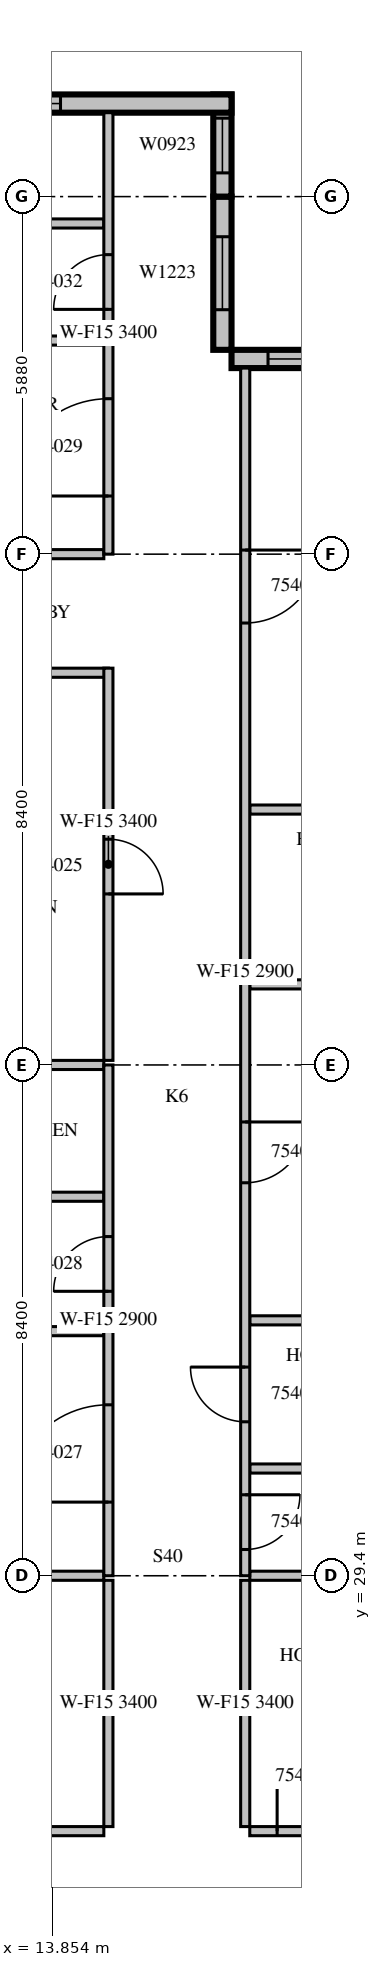
"""IFC4 building model, lengths in metres.
Left out: names, types, materials, properties, quantities, classifications, styles, units other than length and angle.
Written with IfcOpenShell. Run it as: python <this file> out.ifc"""

import sys

from ifc_helpers import new_model, si_unit, direction, frame, frame_2d, origin, place, context, subcontext, project, spatial, rectangle, extrude, source, transform, mapped, element, fill, save


model = new_model("IFC4")
c1 = context("Model", 3, precision=1e-05, world=origin(), true_north=direction((0.0, 1.0)))
c2 = subcontext(c1, "Body", "Model", "MODEL_VIEW")
j1 = project(units=[si_unit("LENGTHUNIT", "METRE"), si_unit("PLANEANGLEUNIT", "RADIAN")], contexts=[c1])
p1 = place(None, origin())
s1 = spatial("IfcSite", under=j1, at=p1, CompositionType="ELEMENT")
p2 = place(p1, origin())
s2 = spatial("IfcBuilding", under=s1, at=p2, CompositionType="ELEMENT")
p3 = place(p2, frame((0.0, 0.0, 238.6)))
s3 = spatial("IfcBuildingStorey", under=s2, at=p3, CompositionType="ELEMENT", Elevation=238.6)
m1 = source(origin(), c2, "Body", "SweptSolid", [
    extrude(rectangle(XDim=4.2, YDim=0.3, at=frame_2d((2.1, 0.0))), origin(), (0.0, 0.0, 1.0), 3.4),
])
p4 = place(p3, frame((21.0, 49.41, 0.0), z_axis=(0.0, 0.0, 1.0), x_axis=(-1.0, 0.0, 0.0)))
e1 = element("IfcWall", 1, at=p4, inside=s3, PredefinedType="STANDARD", context=c2, shape_type="MappedRepresentation", body=[
    mapped(m1, transform((0.0, 0.0, 0.0), scale=1.0)),
])
m2 = source(origin(), c2, "Body", "SweptSolid", [
    extrude(rectangle(XDim=3.0, YDim=2.3, at=frame_2d((1.5, 1.15))), frame((0.0, 0.16, 0.0), z_axis=(0.0, -1.0, 0.0), x_axis=(1.0, 0.0, 0.0)), (0.0, 0.0, 1.0), 0.32),
])
p5 = place(p4, frame((0.6, 0.0, 0.6)))
e2 = element("IfcOpeningElement", 2, at=p5, cuts=e1, PredefinedType="OPENING", context=c2, shape_type="MappedRepresentation", body=[
    mapped(m2, transform((0.0, 0.0, 0.0), scale=1.0)),
])
m3 = source(origin(), c2, "Body", "SweptSolid", [
    extrude(rectangle(XDim=2.52, YDim=0.3, at=frame_2d((1.26, 0.0))), origin(), (0.0, 0.0, 1.0), 3.4),
])
p6 = place(p3, frame((16.65, 49.56, 0.0), z_axis=(0.0, 0.0, 1.0), x_axis=(0.0, 1.0, 0.0)))
e3 = element("IfcWall", 3, at=p6, inside=s3, PredefinedType="STANDARD", context=c2, shape_type="MappedRepresentation", body=[
    mapped(m3, transform((0.0, 0.0, 0.0), scale=1.0)),
])
m4 = source(origin(), c2, "Body", "SweptSolid", [
    extrude(rectangle(XDim=1.2, YDim=2.3, at=frame_2d((0.6, 1.15))), frame((0.0, 0.16, 0.0), z_axis=(0.0, -1.0, 0.0), x_axis=(1.0, 0.0, 0.0)), (0.0, 0.0, 1.0), 0.32),
])
p7 = place(p6, frame((0.66, 0.0, 0.6)))
e4 = element("IfcOpeningElement", 4, at=p7, cuts=e3, PredefinedType="OPENING", context=c2, shape_type="MappedRepresentation", body=[
    mapped(m4, transform((0.0, 0.0, 0.0), scale=1.0)),
])
m5 = source(origin(), c2, "Body", "SweptSolid", [
    extrude(rectangle(XDim=1.68, YDim=0.3, at=frame_2d((0.84, 0.0))), origin(), (0.0, 0.0, 1.0), 3.4),
])
p8 = place(p3, frame((16.65, 52.08, 0.0), z_axis=(0.0, 0.0, 1.0), x_axis=(0.0, 1.0, 0.0)))
e5 = element("IfcWall", 5, at=p8, inside=s3, PredefinedType="STANDARD", context=c2, shape_type="MappedRepresentation", body=[
    mapped(m5, transform((0.0, 0.0, 0.0), scale=1.0)),
])
m6 = source(origin(), c2, "Body", "SweptSolid", [
    extrude(rectangle(XDim=0.9, YDim=2.3, at=frame_2d((0.45, 1.15))), frame((0.0, 0.16, 0.0), z_axis=(0.0, -1.0, 0.0), x_axis=(1.0, 0.0, 0.0)), (0.0, 0.0, 1.0), 0.32),
])
p9 = place(p8, frame((0.39, 0.0, 0.6)))
e6 = element("IfcOpeningElement", 6, at=p9, cuts=e5, PredefinedType="OPENING", context=c2, shape_type="MappedRepresentation", body=[
    mapped(m6, transform((0.0, 0.0, 0.0), scale=1.0)),
])
m7 = source(origin(), c2, "Body", "SweptSolid", [
    extrude(rectangle(XDim=10.5, YDim=0.3, at=frame_2d((5.25, 0.0))), origin(), (0.0, 0.0, 1.0), 3.4),
])
p10 = place(p3, frame((16.8, 53.61, 0.0), z_axis=(0.0, 0.0, 1.0), x_axis=(-1.0, 0.0, 0.0)))
e7 = element("IfcWall", 7, at=p10, inside=s3, PredefinedType="STANDARD", context=c2, shape_type="MappedRepresentation", body=[
    mapped(m7, transform((0.0, 0.0, 0.0), scale=1.0)),
])
m8 = source(origin(), c2, "Body", "SweptSolid", [
    extrude(rectangle(XDim=1.8, YDim=2.3, at=frame_2d((0.9, 1.15))), frame((0.0, 0.16, 0.0), z_axis=(0.0, -1.0, 0.0), x_axis=(1.0, 0.0, 0.0)), (0.0, 0.0, 1.0), 0.32),
])
p11 = place(p10, frame((8.025, 0.0, 0.6)))
e8 = element("IfcOpeningElement", 8, at=p11, cuts=e7, PredefinedType="OPENING", context=c2, shape_type="MappedRepresentation", body=[
    mapped(m8, transform((0.0, 0.0, 0.0), scale=1.0)),
])
m9 = source(origin(), c2, "Body", "SweptSolid", [
    extrude(rectangle(XDim=2.4, YDim=2.3, at=frame_2d((1.2, 1.15))), frame((0.0, 0.16, 0.0), z_axis=(0.0, -1.0, 0.0), x_axis=(1.0, 0.0, 0.0)), (0.0, 0.0, 1.0), 0.32),
])
p12 = place(p10, frame((2.812, 0.0, 0.6)))
e9 = element("IfcOpeningElement", 9, at=p12, cuts=e7, PredefinedType="OPENING", context=c2, shape_type="MappedRepresentation", body=[
    mapped(m9, transform((0.0, 0.0, 0.0), scale=1.0)),
])
m10 = source(origin(), c2, "Body", "SweptSolid", [
    extrude(rectangle(XDim=3.995, YDim=0.15, at=frame_2d((1.998, 0.0))), origin(), (0.0, 0.0, 1.0), 3.4),
])
p13 = place(p3, frame((10.705, 25.2, 0.0), z_axis=(0.0, 0.0, 1.0), x_axis=(1.0, 0.0, 0.0)))
e10 = element("IfcWall", 10, at=p13, inside=s3, PredefinedType="PARTITIONING", context=c2, shape_type="MappedRepresentation", body=[
    mapped(m10, transform((0.0, 0.0, 0.0), scale=1.0)),
])
m11 = source(origin(), c2, "Body", "SweptSolid", [
    extrude(rectangle(XDim=0.9, YDim=2.1, at=frame_2d((0.45, 1.05))), frame((0.0, 0.085, 0.0), z_axis=(0.0, -1.0, 0.0), x_axis=(1.0, 0.0, 0.0)), (0.0, 0.0, 1.0), 0.17),
])
p14 = place(p13, frame((2.132, 0.0, 0.0)))
e11 = element("IfcOpeningElement", 11, at=p14, cuts=e10, PredefinedType="OPENING", context=c2, shape_type="MappedRepresentation", body=[
    mapped(m11, transform((0.0, 0.0, 0.0), scale=1.0)),
])
m12 = source(origin(), c2, "Body", "SweptSolid", [
    extrude(rectangle(XDim=3.6, YDim=0.15, at=frame_2d((1.8, 0.0))), origin(), (0.0, 0.0, 1.0), 3.4),
])
p15 = place(p3, frame((17.1, 25.2, 0.0), z_axis=(0.0, 0.0, 1.0), x_axis=(1.0, 0.0, 0.0)))
e12 = element("IfcWall", 12, at=p15, inside=s3, PredefinedType="PARTITIONING", context=c2, shape_type="MappedRepresentation", body=[
    mapped(m12, transform((0.0, 0.0, 0.0), scale=1.0)),
])
p16 = place(p15, frame((0.45, 0.0, 0.0)))
e13 = element("IfcOpeningElement", 13, at=p16, cuts=e12, PredefinedType="OPENING", context=c2, shape_type="MappedRepresentation", body=[
    mapped(m11, transform((0.0, 0.0, 0.0), scale=1.0)),
])
m13 = source(origin(), c2, "Body", "SweptSolid", [
    extrude(rectangle(XDim=4.05, YDim=0.15, at=frame_2d((2.025, 0.0))), origin(), (0.0, 0.0, 1.0), 3.4),
])
for number, where, z_axis, x_axis in (
    (14, (14.775, 25.275, 0.0), (0.0, 0.0, 1.0), (0.0, 1.0, 0.0)),
    (15, (17.025, 29.325, 0.0), (0.0, 0.0, 1.0), (0.0, -1.0, 0.0)),
):
    element("IfcWall", number, at=place(p3, frame(where, z_axis=z_axis, x_axis=x_axis)), inside=s3, PredefinedType="PARTITIONING", context=c2, shape_type="MappedRepresentation", body=[
        mapped(m13, transform((0.0, 0.0, 0.0), scale=1.0)),
    ])
m14 = source(origin(), c2, "Body", "SweptSolid", [
    extrude(rectangle(XDim=3.801, YDim=0.15, at=frame_2d((1.901, 0.0))), origin(), (0.0, 0.0, 1.0), 3.4),
])
p17 = place(p3, frame((14.7, 29.4, 0.0), z_axis=(0.0, 0.0, 1.0), x_axis=(-1.0, 0.0, 0.0)))
e16 = element("IfcWall", 16, at=p17, inside=s3, PredefinedType="PARTITIONING", context=c2, shape_type="MappedRepresentation", body=[
    mapped(m14, transform((0.0, 0.0, 0.0), scale=1.0)),
])
m15 = source(origin(), c2, "Body", "SweptSolid", [
    extrude(rectangle(XDim=3.101, YDim=0.15, at=frame_2d((1.55, 0.0))), origin(), (0.0, 0.0, 1.0), 3.4),
])
p18 = place(p3, frame((20.201, 29.4, 0.0), z_axis=(0.0, 0.0, 1.0), x_axis=(-1.0, 0.0, 0.0)))
e17 = element("IfcWall", 17, at=p18, inside=s3, PredefinedType="PARTITIONING", context=c2, shape_type="MappedRepresentation", body=[
    mapped(m15, transform((0.0, 0.0, 0.0), scale=1.0)),
])
m16 = source(origin(), c2, "Body", "SweptSolid", [
    extrude(rectangle(XDim=3.275, YDim=0.15, at=frame_2d((1.637, 0.0))), origin(), (0.0, 0.0, 1.0), 3.4),
])
p19 = place(p3, frame((14.775, 44.25, 0.0), z_axis=(0.0, 0.0, 1.0), x_axis=(-1.0, 0.0, 0.0)))
e18 = element("IfcWall", 18, at=p19, inside=s3, PredefinedType="PARTITIONING", context=c2, shape_type="MappedRepresentation", body=[
    mapped(m16, transform((0.0, 0.0, 0.0), scale=1.0)),
])
m17 = source(origin(), c2, "Body", "SweptSolid", [
    extrude(rectangle(XDim=6.45, YDim=0.15, at=frame_2d((3.225, 0.0))), origin(), (0.0, 0.0, 1.0), 3.4),
])
p20 = place(p3, frame((14.775, 37.875, 0.0), z_axis=(0.0, 0.0, 1.0), x_axis=(0.0, 1.0, 0.0)))
e19 = element("IfcWall", 19, at=p20, inside=s3, PredefinedType="PARTITIONING", context=c2, shape_type="MappedRepresentation", body=[
    mapped(m17, transform((0.0, 0.0, 0.0), scale=1.0)),
])
p21 = place(p20, frame((2.737, 0.0, 0.0)))
e20 = element("IfcOpeningElement", 20, at=p21, cuts=e19, PredefinedType="OPENING", context=c2, shape_type="MappedRepresentation", body=[
    mapped(m11, transform((0.0, 0.0, 0.0), scale=1.0)),
])
p22 = place(p3, frame((14.7, 33.422, 0.0), z_axis=(0.0, 0.0, 1.0), x_axis=(-1.0, 0.0, 0.0)))
e21 = element("IfcWall", 21, at=p22, inside=s3, PredefinedType="PARTITIONING", context=c2, shape_type="MappedRepresentation", body=[
    mapped(m10, transform((0.0, 0.0, 0.0), scale=1.0)),
])
p23 = place(p3, frame((14.7, 35.633, 0.0), z_axis=(0.0, 0.0, 1.0), x_axis=(-1.0, 0.0, 0.0)))
e22 = element("IfcWall", 22, at=p23, inside=s3, PredefinedType="PARTITIONING", context=c2, shape_type="MappedRepresentation", body=[
    mapped(m10, transform((0.0, 0.0, 0.0), scale=1.0)),
])
p24 = place(p23, frame((1.548, 0.0, 0.0)))
e23 = element("IfcOpeningElement", 23, at=p24, cuts=e22, PredefinedType="OPENING", context=c2, shape_type="MappedRepresentation", body=[
    mapped(m11, transform((0.0, 0.0, 0.0), scale=1.0)),
])
p25 = place(p3, frame((14.7, 37.8, 0.0), z_axis=(0.0, 0.0, 1.0), x_axis=(-1.0, 0.0, 0.0)))
e24 = element("IfcWall", 24, at=p25, inside=s3, PredefinedType="PARTITIONING", context=c2, shape_type="MappedRepresentation", body=[
    mapped(m14, transform((0.0, 0.0, 0.0), scale=1.0)),
])
m18 = source(origin(), c2, "Body", "SweptSolid", [
    extrude(rectangle(XDim=3.65, YDim=0.15, at=frame_2d((1.825, 0.0))), origin(), (0.0, 0.0, 1.0), 3.4),
])
p26 = place(p3, frame((14.7, 49.713, 0.0), z_axis=(0.0, 0.0, 1.0), x_axis=(-1.0, 0.0, 0.0)))
e25 = element("IfcWall", 25, at=p26, inside=s3, PredefinedType="PARTITIONING", context=c2, shape_type="MappedRepresentation", body=[
    mapped(m18, transform((0.0, 0.0, 0.0), scale=1.0)),
])
p27 = place(p3, frame((14.7, 51.638, 0.0), z_axis=(0.0, 0.0, 1.0), x_axis=(-1.0, 0.0, 0.0)))
e26 = element("IfcWall", 26, at=p27, inside=s3, PredefinedType="PARTITIONING", context=c2, shape_type="MappedRepresentation", body=[
    mapped(m18, transform((0.0, 0.0, 0.0), scale=1.0)),
])
p28 = place(p27, frame((1.375, 0.0, 0.0)))
e27 = element("IfcOpeningElement", 27, at=p28, cuts=e26, PredefinedType="OPENING", context=c2, shape_type="MappedRepresentation", body=[
    mapped(m11, transform((0.0, 0.0, 0.0), scale=1.0)),
])
p29 = place(p3, frame((14.7, 46.2, 0.0), z_axis=(0.0, 0.0, 1.0), x_axis=(-1.0, 0.0, 0.0)))
e28 = element("IfcWall", 28, at=p29, inside=s3, PredefinedType="PARTITIONING", context=c2, shape_type="MappedRepresentation", body=[
    mapped(m18, transform((0.0, 0.0, 0.0), scale=1.0)),
])
m19 = source(origin(), c2, "Body", "SweptSolid", [
    extrude(rectangle(XDim=3.6, YDim=0.15, at=frame_2d((1.8, 0.0))), origin(), (0.0, 0.0, 1.0), 2.4),
])
p30 = place(p3, frame((17.1, 31.163, 0.0), z_axis=(0.0, 0.0, 1.0), x_axis=(1.0, 0.0, 0.0)))
e29 = element("IfcWall", 29, at=p30, inside=s3, PredefinedType="PARTITIONING", context=c2, shape_type="MappedRepresentation", body=[
    mapped(m19, transform((0.0, 0.0, 0.0), scale=1.0)),
])
p31 = place(p3, frame((17.1, 39.125, 0.0), z_axis=(0.0, 0.0, 1.0), x_axis=(1.0, 0.0, 0.0)))
e30 = element("IfcWall", 30, at=p31, inside=s3, PredefinedType="PARTITIONING", context=c2, shape_type="MappedRepresentation", body=[
    mapped(m12, transform((0.0, 0.0, 0.0), scale=1.0)),
])
p32 = place(p31, frame((1.35, 0.0, 0.0)))
e31 = element("IfcOpeningElement", 31, at=p32, cuts=e30, PredefinedType="OPENING", context=c2, shape_type="MappedRepresentation", body=[
    mapped(m11, transform((0.0, 0.0, 0.0), scale=1.0)),
])
p33 = place(p3, frame((20.7, 33.6, 0.0), z_axis=(0.0, 0.0, 1.0), x_axis=(-1.0, 0.0, 0.0)))
e32 = element("IfcWall", 32, at=p33, inside=s3, PredefinedType="PARTITIONING", context=c2, shape_type="MappedRepresentation", body=[
    mapped(m19, transform((0.0, 0.0, 0.0), scale=1.0)),
])
p34 = place(p3, frame((20.7, 42.0, 0.0), z_axis=(0.0, 0.0, 1.0), x_axis=(-1.0, 0.0, 0.0)))
e33 = element("IfcWall", 33, at=p34, inside=s3, PredefinedType="PARTITIONING", context=c2, shape_type="MappedRepresentation", body=[
    mapped(m12, transform((0.0, 0.0, 0.0), scale=1.0)),
])
m20 = source(origin(), c2, "Body", "SweptSolid", [
    extrude(rectangle(XDim=8.4, YDim=0.15, at=frame_2d((4.2, 0.0))), origin(), (0.0, 0.0, 1.0), 2.9),
])
p35 = place(p3, frame((14.775, 29.4, 0.0), z_axis=(0.0, 0.0, 1.0), x_axis=(0.0, 1.0, 0.0)))
e34 = element("IfcWall", 34, at=p35, inside=s3, PredefinedType="PARTITIONING", context=c2, shape_type="MappedRepresentation", body=[
    mapped(m20, transform((0.0, 0.0, 0.0), scale=1.0)),
])
m21 = source(origin(), c2, "Body", "SweptSolid", [
    extrude(rectangle(XDim=1.6, YDim=2.1, at=frame_2d((0.8, 1.05))), frame((0.0, 0.085, 0.0), z_axis=(0.0, -1.0, 0.0), x_axis=(1.0, 0.0, 0.0)), (0.0, 0.0, 1.0), 0.17),
])
p36 = place(p35, frame((1.211, 0.0, 0.0)))
e35 = element("IfcOpeningElement", 35, at=p36, cuts=e34, PredefinedType="OPENING", context=c2, shape_type="MappedRepresentation", body=[
    mapped(m21, transform((0.0, 0.0, 0.0), scale=1.0)),
])
p37 = place(p35, frame((4.678, 0.0, 0.0)))
e36 = element("IfcOpeningElement", 36, at=p37, cuts=e34, PredefinedType="OPENING", context=c2, shape_type="MappedRepresentation", body=[
    mapped(m11, transform((0.0, 0.0, 0.0), scale=1.0)),
])
m22 = source(origin(), c2, "Body", "SweptSolid", [
    extrude(rectangle(XDim=7.26, YDim=0.15, at=frame_2d((3.63, 0.0))), origin(), (0.0, 0.0, 1.0), 3.4),
])
p38 = place(p3, frame((14.775, 46.2, 0.0), z_axis=(0.0, 0.0, 1.0), x_axis=(0.0, 1.0, 0.0)))
e37 = element("IfcWall", 37, at=p38, inside=s3, PredefinedType="PARTITIONING", context=c2, shape_type="MappedRepresentation", body=[
    mapped(m22, transform((0.0, 0.0, 0.0), scale=1.0)),
])
p39 = place(p38, frame((0.956, 0.0, 0.0)))
e38 = element("IfcOpeningElement", 38, at=p39, cuts=e37, PredefinedType="OPENING", context=c2, shape_type="MappedRepresentation", body=[
    mapped(m21, transform((0.0, 0.0, 0.0), scale=1.0)),
])
p40 = place(p38, frame((4.025, 0.0, 0.0)))
e39 = element("IfcOpeningElement", 39, at=p40, cuts=e37, PredefinedType="OPENING", context=c2, shape_type="MappedRepresentation", body=[
    mapped(m11, transform((0.0, 0.0, 0.0), scale=1.0)),
])
m23 = source(origin(), c2, "Body", "SweptSolid", [
    extrude(rectangle(XDim=19.86, YDim=0.15, at=frame_2d((9.93, 0.0))), origin(), (0.0, 0.0, 1.0), 2.9),
])
p41 = place(p3, frame((17.025, 49.26, 0.0), z_axis=(0.0, 0.0, 1.0), x_axis=(0.0, -1.0, 0.0)))
e40 = element("IfcWall", 40, at=p41, inside=s3, PredefinedType="PARTITIONING", context=c2, shape_type="MappedRepresentation", body=[
    mapped(m23, transform((0.0, 0.0, 0.0), scale=1.0)),
])
p42 = place(p41, frame((18.528, 0.0, 0.0)))
e41 = element("IfcOpeningElement", 41, at=p42, cuts=e40, PredefinedType="OPENING", context=c2, shape_type="MappedRepresentation", body=[
    mapped(m11, transform((0.0, 0.0, 0.0), scale=1.0)),
])
p43 = place(p41, frame((16.428, 0.0, 0.0)))
e42 = element("IfcOpeningElement", 42, at=p43, cuts=e40, PredefinedType="OPENING", context=c2, shape_type="MappedRepresentation", body=[
    mapped(m11, transform((0.0, 0.0, 0.0), scale=1.0)),
])
m24 = source(origin(), c2, "Body", "SweptSolid", [
    extrude(rectangle(XDim=1.0, YDim=2.1, at=frame_2d((0.5, 1.05))), frame((0.0, 0.085, 0.0), z_axis=(0.0, -1.0, 0.0), x_axis=(1.0, 0.0, 0.0)), (0.0, 0.0, 1.0), 0.17),
])
p44 = place(p41, frame((12.398, 0.0, 0.0)))
e43 = element("IfcOpeningElement", 43, at=p44, cuts=e40, PredefinedType="OPENING", context=c2, shape_type="MappedRepresentation", body=[
    mapped(m24, transform((0.0, 0.0, 0.0), scale=1.0)),
])
m25 = source(origin(), c2, "Body", "SweptSolid", [
    extrude(rectangle(XDim=1.2, YDim=2.1, at=frame_2d((0.6, 1.05))), frame((0.0, 0.085, 0.0), z_axis=(0.0, -1.0, 0.0), x_axis=(1.0, 0.0, 0.0)), (0.0, 0.0, 1.0), 0.17),
])
p45 = place(p41, frame((2.993, 0.0, 0.0)))
e44 = element("IfcOpeningElement", 44, at=p45, cuts=e40, PredefinedType="OPENING", context=c2, shape_type="MappedRepresentation", body=[
    mapped(m25, transform((0.0, 0.0, 0.0), scale=1.0)),
])
m26 = source(origin(), c2, "Body", "SweptSolid", [
    extrude(rectangle(XDim=3.0, YDim=2.3, at=frame_2d((1.5, 1.15))), frame((0.0, 0.03, 0.0), z_axis=(0.0, -1.0, 0.0), x_axis=(1.0, 0.0, 0.0)), (0.0, 0.0, 1.0), 0.06),
])
p46 = place(p5, origin())
e45 = element("IfcWindow", 45, at=p46, inside=s3, PartitioningType="SINGLE_PANEL", PredefinedType="WINDOW", context=c2, shape_type="MappedRepresentation", body=[
    mapped(m26, transform((0.0, 0.0, 0.0), scale=1.0)),
])
fill(e2, e45)
m27 = source(origin(), c2, "Body", "SweptSolid", [
    extrude(rectangle(XDim=1.2, YDim=2.3, at=frame_2d((0.6, 1.15))), frame((0.0, 0.03, 0.0), z_axis=(0.0, -1.0, 0.0), x_axis=(1.0, 0.0, 0.0)), (0.0, 0.0, 1.0), 0.06),
])
p47 = place(p7, origin())
e46 = element("IfcWindow", 46, at=p47, inside=s3, PartitioningType="SINGLE_PANEL", PredefinedType="WINDOW", context=c2, shape_type="MappedRepresentation", body=[
    mapped(m27, transform((0.0, 0.0, 0.0), scale=1.0)),
])
fill(e4, e46)
m28 = source(origin(), c2, "Body", "SweptSolid", [
    extrude(rectangle(XDim=0.9, YDim=2.3, at=frame_2d((0.45, 1.15))), frame((0.0, 0.03, 0.0), z_axis=(0.0, -1.0, 0.0), x_axis=(1.0, 0.0, 0.0)), (0.0, 0.0, 1.0), 0.06),
])
p48 = place(p9, origin())
e47 = element("IfcWindow", 47, at=p48, inside=s3, PartitioningType="SINGLE_PANEL", PredefinedType="WINDOW", context=c2, shape_type="MappedRepresentation", body=[
    mapped(m28, transform((0.0, 0.0, 0.0), scale=1.0)),
])
fill(e6, e47)
m29 = source(origin(), c2, "Body", "SweptSolid", [
    extrude(rectangle(XDim=2.4, YDim=2.3, at=frame_2d((1.2, 1.15))), frame((0.0, 0.03, 0.0), z_axis=(0.0, -1.0, 0.0), x_axis=(1.0, 0.0, 0.0)), (0.0, 0.0, 1.0), 0.06),
])
p49 = place(p12, origin())
e48 = element("IfcWindow", 48, at=p49, inside=s3, PartitioningType="SINGLE_PANEL", PredefinedType="WINDOW", context=c2, shape_type="MappedRepresentation", body=[
    mapped(m29, transform((0.0, 0.0, 0.0), scale=1.0)),
])
fill(e9, e48)
m30 = source(origin(), c2, "Body", "SweptSolid", [
    extrude(rectangle(XDim=0.9, YDim=2.1, at=frame_2d((0.45, 1.05))), frame((0.0, 0.025, 0.0), z_axis=(0.0, -1.0, 0.0), x_axis=(1.0, 0.0, 0.0)), (0.0, 0.0, 1.0), 0.05),
])
p50 = place(p16, origin())
e49 = element("IfcDoor", 49, at=p50, inside=s3, OperationType="SINGLE_SWING_LEFT", PredefinedType="DOOR", context=c2, shape_type="MappedRepresentation", body=[
    mapped(m30, transform((0.0, 0.0, 0.0), scale=1.0)),
])
fill(e13, e49)
p51 = place(p21, origin())
e50 = element("IfcDoor", 50, at=p51, inside=s3, OperationType="SINGLE_SWING_RIGHT", PredefinedType="DOOR", context=c2, shape_type="MappedRepresentation", body=[
    mapped(m30, transform((0.0, 0.0, 0.0), scale=1.0)),
])
fill(e20, e50)
m31 = source(origin(), c2, "Body", "SweptSolid", [
    extrude(rectangle(XDim=1.6, YDim=2.1, at=frame_2d((0.8, 1.05))), frame((0.0, 0.025, 0.0), z_axis=(0.0, -1.0, 0.0), x_axis=(1.0, 0.0, 0.0)), (0.0, 0.0, 1.0), 0.05),
])
p52 = place(p36, origin())
e51 = element("IfcDoor", 51, at=p52, inside=s3, OperationType="SINGLE_SWING_LEFT", PredefinedType="DOOR", context=c2, shape_type="MappedRepresentation", body=[
    mapped(m31, transform((0.0, 0.0, 0.0), scale=1.0)),
])
fill(e35, e51)
p53 = place(p37, origin())
e52 = element("IfcDoor", 52, at=p53, inside=s3, OperationType="SINGLE_SWING_LEFT", PredefinedType="DOOR", context=c2, shape_type="MappedRepresentation", body=[
    mapped(m30, transform((0.0, 0.0, 0.0), scale=1.0)),
])
fill(e36, e52)
p54 = place(p39, origin())
e53 = element("IfcDoor", 53, at=p54, inside=s3, OperationType="SINGLE_SWING_LEFT", PredefinedType="DOOR", context=c2, shape_type="MappedRepresentation", body=[
    mapped(m31, transform((0.0, 0.0, 0.0), scale=1.0)),
])
fill(e38, e53)
p55 = place(p40, origin())
e54 = element("IfcDoor", 54, at=p55, inside=s3, OperationType="SINGLE_SWING_LEFT", PredefinedType="DOOR", context=c2, shape_type="MappedRepresentation", body=[
    mapped(m30, transform((0.0, 0.0, 0.0), scale=1.0)),
])
fill(e39, e54)
p56 = place(p42, origin())
e55 = element("IfcDoor", 55, at=p56, inside=s3, OperationType="SINGLE_SWING_LEFT", PredefinedType="DOOR", context=c2, shape_type="MappedRepresentation", body=[
    mapped(m30, transform((0.0, 0.0, 0.0), scale=1.0)),
])
fill(e41, e55)
p57 = place(p43, origin())
e56 = element("IfcDoor", 56, at=p57, inside=s3, OperationType="SINGLE_SWING_RIGHT", PredefinedType="DOOR", context=c2, shape_type="MappedRepresentation", body=[
    mapped(m30, transform((0.0, 0.0, 0.0), scale=1.0)),
])
fill(e42, e56)
m32 = source(origin(), c2, "Body", "SweptSolid", [
    extrude(rectangle(XDim=1.0, YDim=2.1, at=frame_2d((0.5, 1.05))), frame((0.0, 0.025, 0.0), z_axis=(0.0, -1.0, 0.0), x_axis=(1.0, 0.0, 0.0)), (0.0, 0.0, 1.0), 0.05),
])
p58 = place(p44, origin())
e57 = element("IfcDoor", 57, at=p58, inside=s3, OperationType="SINGLE_SWING_LEFT", PredefinedType="DOOR", context=c2, shape_type="MappedRepresentation", body=[
    mapped(m32, transform((0.0, 0.0, 0.0), scale=1.0)),
])
fill(e43, e57)
m33 = source(origin(), c2, "Body", "SweptSolid", [
    extrude(rectangle(XDim=1.2, YDim=2.1, at=frame_2d((0.6, 1.05))), frame((0.0, 0.025, 0.0), z_axis=(0.0, -1.0, 0.0), x_axis=(1.0, 0.0, 0.0)), (0.0, 0.0, 1.0), 0.05),
])
p59 = place(p45, origin())
e58 = element("IfcDoor", 58, at=p59, inside=s3, OperationType="SINGLE_SWING_LEFT", PredefinedType="DOOR", context=c2, shape_type="MappedRepresentation", body=[
    mapped(m33, transform((0.0, 0.0, 0.0), scale=1.0)),
])
fill(e44, e58)
save(model, sys.argv[1])
